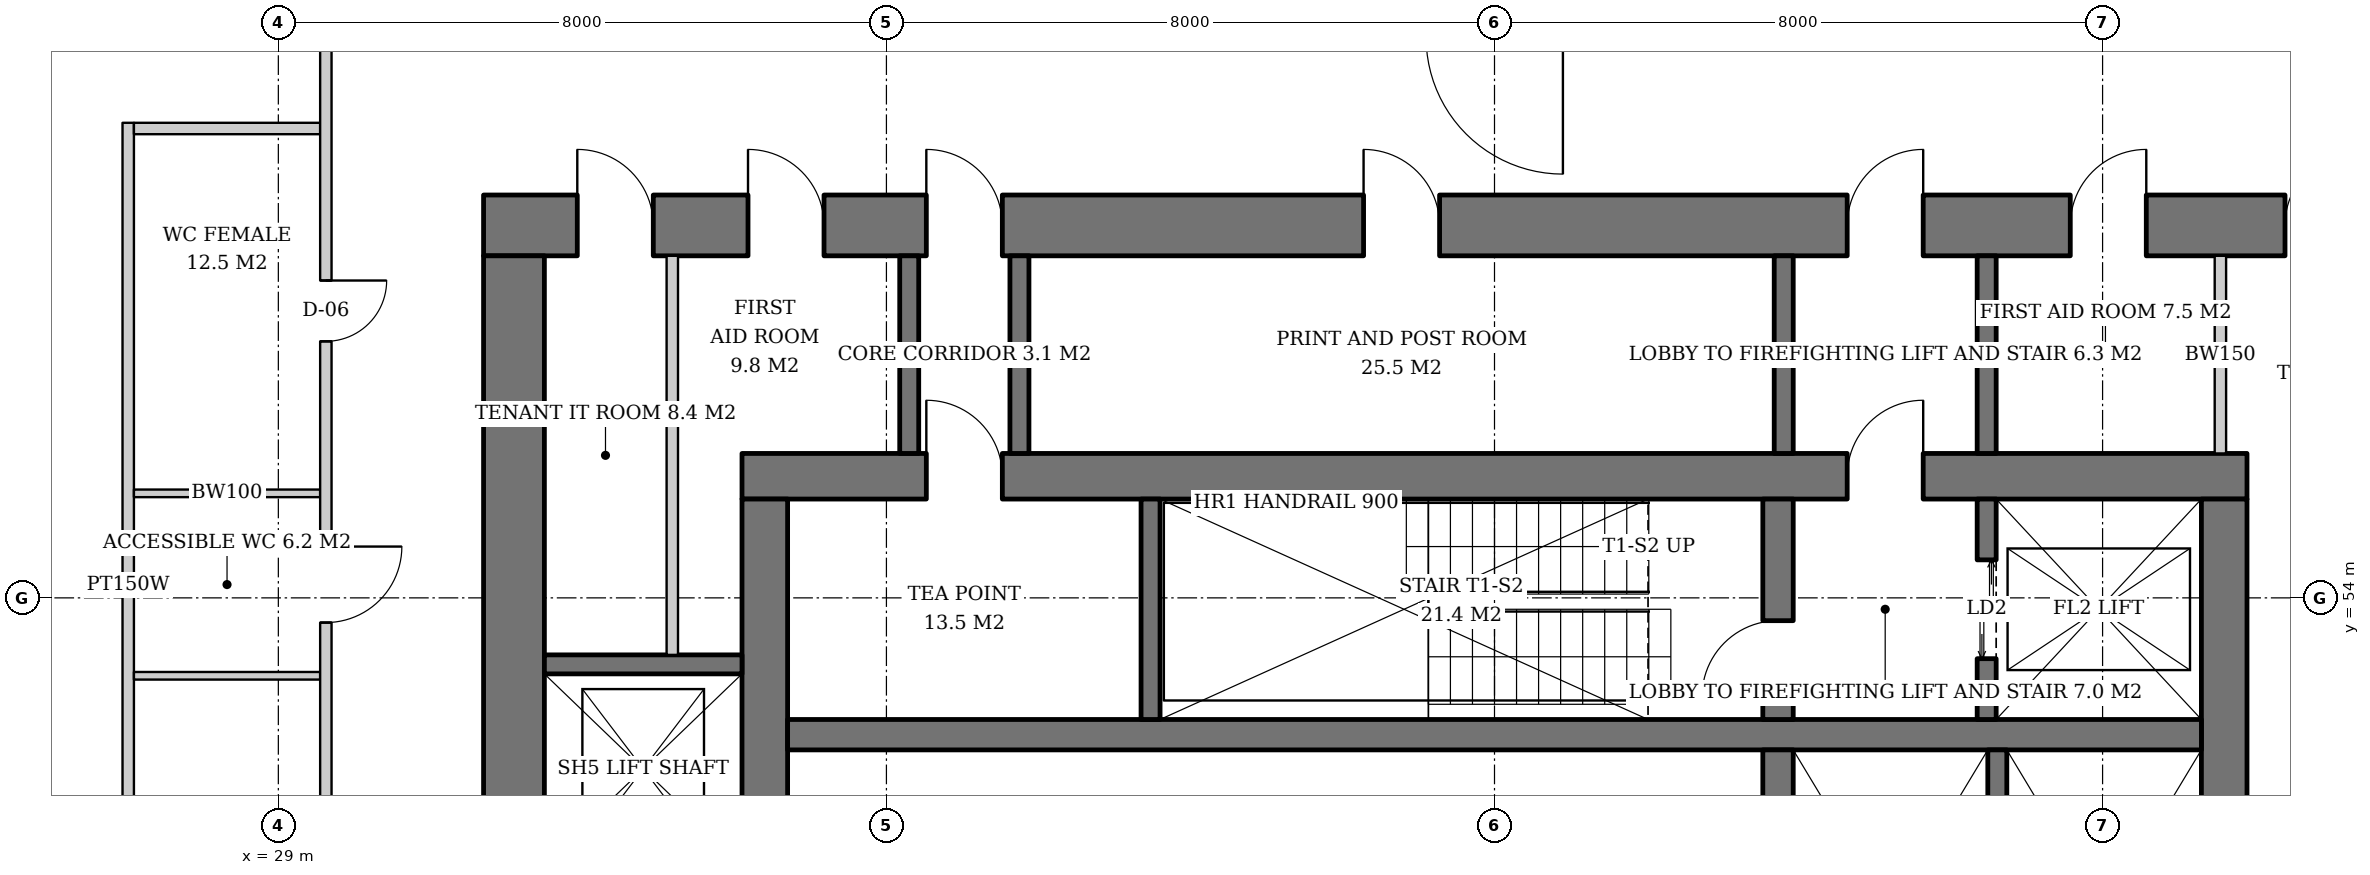
"""IFC4 building model, lengths in metres.
Left out: names, types, materials, properties, quantities, classifications, styles, units other than length and angle.
Written with IfcOpenShell. Run it as: python <this file> out.ifc"""

import sys

from ifc_helpers import new_model, si_unit, direction, frame, frame_2d, origin, place, context, subcontext, project, spatial, rectangle, extrude, element, fill, save


model = new_model("IFC4")
c1 = context("Model", 3, precision=1e-05, world=origin(), true_north=direction((0.0, 1.0)))
c2 = subcontext(c1, "Body", "Model", "MODEL_VIEW")
j1 = project(units=[si_unit("LENGTHUNIT", "METRE"), si_unit("PLANEANGLEUNIT", "RADIAN")], contexts=[c1])
p1 = place(None, origin())
s1 = spatial("IfcSite", under=j1, at=p1, CompositionType="ELEMENT")
p2 = place(p1, origin())
s2 = spatial("IfcBuilding", under=s1, at=p2, CompositionType="ELEMENT")
p3 = place(p2, frame((0.0, 0.0, 21.0)))
s3 = spatial("IfcBuildingStorey", under=s2, at=p3, CompositionType="ELEMENT", Elevation=21.0)
p4 = place(p3, frame((35.1, 55.6, 0.0), z_axis=(0.0, 0.0, 1.0), x_axis=(1.0, 0.0, 0.0)))
e1 = element("IfcWall", 1, at=p4, inside=s3, PredefinedType="SHEAR", context=c2, shape_type="SweptSolid", body=[
    extrude(rectangle(XDim=19.8, YDim=0.6, at=frame_2d((9.9, 0.0))), origin(), (0.0, 0.0, 1.0), 3.8),
])
p5 = place(p4, frame((14.54, 0.0, 0.0)))
e2 = element("IfcOpeningElement", 2, at=p5, cuts=e1, PredefinedType="OPENING", context=c2, shape_type="SweptSolid", body=[
    extrude(rectangle(XDim=1.0, YDim=2.1, at=frame_2d((0.5, 1.05))), frame((0.0, 0.31, 0.0), z_axis=(0.0, -1.0, 0.0), x_axis=(1.0, 0.0, 0.0)), (0.0, 0.0, 1.0), 0.62),
])
p6 = place(p4, frame((2.425, 0.0, 0.0)))
e3 = element("IfcOpeningElement", 3, at=p6, cuts=e1, PredefinedType="OPENING", context=c2, shape_type="SweptSolid", body=[
    extrude(rectangle(XDim=1.0, YDim=2.1, at=frame_2d((0.5, 1.05))), frame((0.0, 0.31, 0.0), z_axis=(0.0, -1.0, 0.0), x_axis=(1.0, 0.0, 0.0)), (0.0, 0.0, 1.0), 0.62),
])
p7 = place(p3, frame((35.4, 36.7, 0.0), z_axis=(0.0, 0.0, 1.0), x_axis=(0.0, 1.0, 0.0)))
e4 = element("IfcWall", 4, at=p7, inside=s3, PredefinedType="SHEAR", context=c2, shape_type="SweptSolid", body=[
    extrude(rectangle(XDim=18.6, YDim=0.6, at=frame_2d((9.3, 0.0))), origin(), (0.0, 0.0, 1.0), 3.8),
])
p8 = place(p7, frame((8.4, 0.0, 0.0)))
e5 = element("IfcOpeningElement", 5, at=p8, cuts=e4, PredefinedType="OPENING", context=c2, shape_type="SweptSolid", body=[
    extrude(rectangle(XDim=1.8, YDim=2.4, at=frame_2d((0.9, 1.2))), frame((0.0, 0.31, 0.0), z_axis=(0.0, -1.0, 0.0), x_axis=(1.0, 0.0, 0.0)), (0.0, 0.0, 1.0), 0.62),
])
p9 = place(p3, frame((54.6, 36.7, 0.0), z_axis=(0.0, 0.0, 1.0), x_axis=(0.0, 1.0, 0.0)))
e6 = element("IfcWall", 6, at=p9, inside=s3, PredefinedType="SHEAR", context=c2, shape_type="SweptSolid", body=[
    extrude(rectangle(XDim=18.6, YDim=0.6, at=frame_2d((9.3, 0.0))), origin(), (0.0, 0.0, 1.0), 3.8),
])
p10 = place(p9, frame((8.4, 0.0, 0.0)))
e7 = element("IfcOpeningElement", 7, at=p10, cuts=e6, PredefinedType="OPENING", context=c2, shape_type="SweptSolid", body=[
    extrude(rectangle(XDim=1.8, YDim=2.4, at=frame_2d((0.9, 1.2))), frame((0.0, 0.31, 0.0), z_axis=(0.0, -1.0, 0.0), x_axis=(1.0, 0.0, 0.0)), (0.0, 0.0, 1.0), 0.62),
])
p11 = place(p3, frame((31.7, 58.9, 0.0), z_axis=(0.0, 0.0, 1.0), x_axis=(1.0, 0.0, 0.0)))
e8 = element("IfcWall", 8, at=p11, inside=s3, PredefinedType="SHEAR", context=c2, shape_type="SweptSolid", body=[
    extrude(rectangle(XDim=26.6, YDim=0.8, at=frame_2d((13.3, 0.0))), origin(), (0.0, 0.0, 1.0), 3.8),
])
p12 = place(p11, frame((17.94, 0.0, 0.0)))
e9 = element("IfcOpeningElement", 9, at=p12, cuts=e8, PredefinedType="OPENING", context=c2, shape_type="SweptSolid", body=[
    extrude(rectangle(XDim=1.0, YDim=2.1, at=frame_2d((0.5, 1.05))), frame((0.0, 0.41, 0.0), z_axis=(0.0, -1.0, 0.0), x_axis=(1.0, 0.0, 0.0)), (0.0, 0.0, 1.0), 0.82),
])
p13 = place(p11, frame((5.825, 0.0, 0.0)))
e10 = element("IfcOpeningElement", 10, at=p13, cuts=e8, PredefinedType="OPENING", context=c2, shape_type="SweptSolid", body=[
    extrude(rectangle(XDim=1.0, YDim=2.1, at=frame_2d((0.5, 1.05))), frame((0.0, 0.41, 0.0), z_axis=(0.0, -1.0, 0.0), x_axis=(1.0, 0.0, 0.0)), (0.0, 0.0, 1.0), 0.82),
])
p14 = place(p11, frame((1.233, 0.0, 0.0)))
e11 = element("IfcOpeningElement", 11, at=p14, cuts=e8, PredefinedType="OPENING", context=c2, shape_type="SweptSolid", body=[
    extrude(rectangle(XDim=1.0, YDim=2.1, at=frame_2d((0.5, 1.05))), frame((0.0, 0.41, 0.0), z_axis=(0.0, -1.0, 0.0), x_axis=(1.0, 0.0, 0.0)), (0.0, 0.0, 1.0), 0.82),
])
p15 = place(p11, frame((3.479, 0.0, 0.0)))
e12 = element("IfcOpeningElement", 12, at=p15, cuts=e8, PredefinedType="OPENING", context=c2, shape_type="SweptSolid", body=[
    extrude(rectangle(XDim=1.0, YDim=2.1, at=frame_2d((0.5, 1.05))), frame((0.0, 0.41, 0.0), z_axis=(0.0, -1.0, 0.0), x_axis=(1.0, 0.0, 0.0)), (0.0, 0.0, 1.0), 0.82),
])
p16 = place(p11, frame((11.577, 0.0, 0.0)))
e13 = element("IfcOpeningElement", 13, at=p16, cuts=e8, PredefinedType="OPENING", context=c2, shape_type="SweptSolid", body=[
    extrude(rectangle(XDim=1.0, YDim=2.1, at=frame_2d((0.5, 1.05))), frame((0.0, 0.41, 0.0), z_axis=(0.0, -1.0, 0.0), x_axis=(1.0, 0.0, 0.0)), (0.0, 0.0, 1.0), 0.82),
])
p17 = place(p11, frame((20.875, 0.0, 0.0)))
e14 = element("IfcOpeningElement", 14, at=p17, cuts=e8, PredefinedType="OPENING", context=c2, shape_type="SweptSolid", body=[
    extrude(rectangle(XDim=1.0, YDim=2.1, at=frame_2d((0.5, 1.05))), frame((0.0, 0.41, 0.0), z_axis=(0.0, -1.0, 0.0), x_axis=(1.0, 0.0, 0.0)), (0.0, 0.0, 1.0), 0.82),
])
p18 = place(p11, frame((23.7, 0.0, 0.0)))
e15 = element("IfcOpeningElement", 15, at=p18, cuts=e8, PredefinedType="OPENING", context=c2, shape_type="SweptSolid", body=[
    extrude(rectangle(XDim=1.0, YDim=2.1, at=frame_2d((0.5, 1.05))), frame((0.0, 0.41, 0.0), z_axis=(0.0, -1.0, 0.0), x_axis=(1.0, 0.0, 0.0)), (0.0, 0.0, 1.0), 0.82),
])
p19 = place(p3, frame((32.1, 33.5, 0.0), z_axis=(0.0, 0.0, 1.0), x_axis=(0.0, 1.0, 0.0)))
e16 = element("IfcWall", 16, at=p19, inside=s3, PredefinedType="SHEAR", context=c2, shape_type="SweptSolid", body=[
    extrude(rectangle(XDim=25.0, YDim=0.8, at=frame_2d((12.5, 0.0))), origin(), (0.0, 0.0, 1.0), 3.8),
])
p20 = place(p19, frame((11.6, 0.0, 0.0)))
e17 = element("IfcOpeningElement", 17, at=p20, cuts=e16, PredefinedType="OPENING", context=c2, shape_type="SweptSolid", body=[
    extrude(rectangle(XDim=1.8, YDim=2.4, at=frame_2d((0.9, 1.2))), frame((0.0, 0.41, 0.0), z_axis=(0.0, -1.0, 0.0), x_axis=(1.0, 0.0, 0.0)), (0.0, 0.0, 1.0), 0.82),
])
p21 = place(p3, frame((35.7, 52.2, 0.0), z_axis=(0.0, 0.0, 1.0), x_axis=(1.0, 0.0, 0.0)))
e18 = element("IfcWall", 18, at=p21, inside=s3, PredefinedType="SHEAR", context=c2, shape_type="SweptSolid", body=[
    extrude(rectangle(XDim=18.6, YDim=0.4, at=frame_2d((9.3, 0.0))), origin(), (0.0, 0.0, 1.0), 3.8),
])
p22 = place(p3, frame((48.73, 40.0, 0.0), z_axis=(0.0, 0.0, 1.0), x_axis=(0.0, 1.0, 0.0)))
e19 = element("IfcWall", 19, at=p22, inside=s3, PredefinedType="SHEAR", context=c2, shape_type="SweptSolid", body=[
    extrude(rectangle(XDim=12.0, YDim=0.4, at=frame_2d((6.0, 0.0))), origin(), (0.0, 0.0, 1.0), 3.8),
])
p23 = place(p3, frame((48.73, 52.4, 0.0), z_axis=(0.0, 0.0, 1.0), x_axis=(0.0, 1.0, 0.0)))
e20 = element("IfcWall", 20, at=p23, inside=s3, PredefinedType="SHEAR", context=c2, shape_type="SweptSolid", body=[
    extrude(rectangle(XDim=2.9, YDim=0.4, at=frame_2d((1.45, 0.0))), origin(), (0.0, 0.0, 1.0), 3.8),
])
p24 = place(p23, frame((0.3, 0.0, 0.0)))
e21 = element("IfcOpeningElement", 21, at=p24, cuts=e20, PredefinedType="OPENING", context=c2, shape_type="SweptSolid", body=[
    extrude(rectangle(XDim=1.0, YDim=2.1, at=frame_2d((0.5, 1.05))), frame((0.0, 0.21, 0.0), z_axis=(0.0, -1.0, 0.0), x_axis=(1.0, 0.0, 0.0)), (0.0, 0.0, 1.0), 0.42),
])
p25 = place(p3, frame((40.475, 52.4, 0.0), z_axis=(0.0, 0.0, 1.0), x_axis=(0.0, 1.0, 0.0)))
e22 = element("IfcWall", 22, at=p25, inside=s3, PredefinedType="SHEAR", context=c2, shape_type="SweptSolid", body=[
    extrude(rectangle(XDim=2.9, YDim=0.25, at=frame_2d((1.45, 0.0))), origin(), (0.0, 0.0, 1.0), 3.8),
])
p26 = place(p3, frame((51.475, 52.4, 0.0), z_axis=(0.0, 0.0, 1.0), x_axis=(0.0, 1.0, 0.0)))
e23 = element("IfcWall", 23, at=p26, inside=s3, PredefinedType="SHEAR", context=c2, shape_type="SweptSolid", body=[
    extrude(rectangle(XDim=2.9, YDim=0.25, at=frame_2d((1.45, 0.0))), origin(), (0.0, 0.0, 1.0), 3.8),
])
p27 = place(p26, frame((0.8, 0.0, 0.0)))
e24 = element("IfcOpeningElement", 24, at=p27, cuts=e23, PredefinedType="OPENING", context=c2, shape_type="SweptSolid", body=[
    extrude(rectangle(XDim=1.3, YDim=2.2, at=frame_2d((0.65, 1.1))), frame((0.0, 0.135, 0.0), z_axis=(0.0, -1.0, 0.0), x_axis=(1.0, 0.0, 0.0)), (0.0, 0.0, 1.0), 0.27),
])
p28 = place(p3, frame((51.615, 47.75, 0.0), z_axis=(0.0, 0.0, 1.0), x_axis=(0.0, 1.0, 0.0)))
e25 = element("IfcWall", 25, at=p28, inside=s3, PredefinedType="SHEAR", context=c2, shape_type="SweptSolid", body=[
    extrude(rectangle(XDim=4.25, YDim=0.25, at=frame_2d((2.125, 0.0))), origin(), (0.0, 0.0, 1.0), 3.8),
])
p29 = place(p3, frame((32.5, 53.125, 0.0), z_axis=(0.0, 0.0, 1.0), x_axis=(1.0, 0.0, 0.0)))
e26 = element("IfcWall", 26, at=p29, inside=s3, PredefinedType="SHEAR", context=c2, shape_type="SweptSolid", body=[
    extrude(rectangle(XDim=2.6, YDim=0.25, at=frame_2d((1.3, 0.0))), origin(), (0.0, 0.0, 1.0), 3.8),
])
for number, where, z_axis, x_axis in (
    (27, (48.805, 55.9, 0.0), (0.0, 0.0, 1.0), (0.0, 1.0, 0.0)),
    (28, (51.475, 55.9, 0.0), (0.0, 0.0, 1.0), (0.0, 1.0, 0.0)),
    (29, (37.3, 55.9, 0.0), (0.0, 0.0, 1.0), (0.0, 1.0, 0.0)),
    (30, (38.75, 55.9, 0.0), (0.0, 0.0, 1.0), (0.0, 1.0, 0.0)),
):
    element("IfcWall", number, at=place(p3, frame(where, z_axis=z_axis, x_axis=x_axis)), inside=s3, PredefinedType="SOLIDWALL", context=c2, shape_type="SweptSolid", body=[
        extrude(rectangle(XDim=2.6, YDim=0.25, at=frame_2d((1.3, 0.0))), origin(), (0.0, 0.0, 1.0), 3.62),
    ])
p30 = place(p3, frame((34.183, 53.25, 0.0), z_axis=(0.0, 0.0, 1.0), x_axis=(0.0, 1.0, 0.0)))
e31 = element("IfcWall", 31, at=p30, inside=s3, PredefinedType="SOLIDWALL", context=c2, shape_type="SweptSolid", body=[
    extrude(rectangle(XDim=5.25, YDim=0.15, at=frame_2d((2.625, 0.0))), origin(), (0.0, 0.0, 1.0), 3.62),
])
p31 = place(p3, frame((54.55, 55.9, 0.0), z_axis=(0.0, 0.0, 1.0), x_axis=(0.0, 1.0, 0.0)))
e32 = element("IfcWall", 32, at=p31, inside=s3, PredefinedType="SOLIDWALL", context=c2, shape_type="SweptSolid", body=[
    extrude(rectangle(XDim=2.6, YDim=0.15, at=frame_2d((1.3, 0.0))), origin(), (0.0, 0.0, 1.0), 3.62),
])
p32 = place(p3, frame((27.025, 60.25, 0.0), z_axis=(0.0, 0.0, 1.0), x_axis=(0.0, -1.0, 0.0)))
e33 = element("IfcWall", 33, at=p32, inside=s3, PredefinedType="PARTITIONING", context=c2, shape_type="SweptSolid", body=[
    extrude(rectangle(XDim=12.15, YDim=0.15, at=frame_2d((6.075, 0.0))), origin(), (0.0, 0.0, 1.0), 2.612),
])
p33 = place(p3, frame((29.55, 60.175, 0.0), z_axis=(0.0, 0.0, 1.0), x_axis=(-1.0, 0.0, 0.0)))
e34 = element("IfcWall", 34, at=p33, inside=s3, PredefinedType="PARTITIONING", context=c2, shape_type="SweptSolid", body=[
    extrude(rectangle(XDim=2.45, YDim=0.15, at=frame_2d((1.225, 0.0))), origin(), (0.0, 0.0, 1.0), 2.806),
])
for number, where, z_axis, x_axis in (
    (35, (29.55, 55.375, 0.0), (0.0, 0.0, 1.0), (-1.0, 0.0, 0.0)),
    (36, (29.55, 52.975, 0.0), (0.0, 0.0, 1.0), (-1.0, 0.0, 0.0)),
):
    element("IfcWall", number, at=place(p3, frame(where, z_axis=z_axis, x_axis=x_axis)), inside=s3, PredefinedType="SOLIDWALL", context=c2, shape_type="SweptSolid", body=[
        extrude(rectangle(XDim=2.45, YDim=0.1, at=frame_2d((1.225, 0.0))), origin(), (0.0, 0.0, 1.0), 3.62),
    ])
p34 = place(p3, frame((29.625, 61.45, 0.0), z_axis=(0.0, 0.0, 1.0), x_axis=(0.0, -1.0, 0.0)))
e37 = element("IfcWall", 37, at=p34, inside=s3, PredefinedType="PARTITIONING", context=c2, shape_type="SweptSolid", body=[
    extrude(rectangle(XDim=30.75, YDim=0.15, at=frame_2d((15.375, 0.0))), origin(), (0.0, 0.0, 1.0), 2.612),
])
p35 = place(p34, frame((3.275, 0.0, 0.0)))
e38 = element("IfcOpeningElement", 38, at=p35, cuts=e37, PredefinedType="OPENING", context=c2, shape_type="SweptSolid", body=[
    extrude(rectangle(XDim=0.8, YDim=2.1, at=frame_2d((0.4, 1.05))), frame((0.0, 0.085, 0.0), z_axis=(0.0, -1.0, 0.0), x_axis=(1.0, 0.0, 0.0)), (0.0, 0.0, 1.0), 0.17),
])
p36 = place(p34, frame((6.775, 0.0, 0.0)))
e39 = element("IfcOpeningElement", 39, at=p36, cuts=e37, PredefinedType="OPENING", context=c2, shape_type="SweptSolid", body=[
    extrude(rectangle(XDim=1.0, YDim=2.1, at=frame_2d((0.5, 1.05))), frame((0.0, 0.085, 0.0), z_axis=(0.0, -1.0, 0.0), x_axis=(1.0, 0.0, 0.0)), (0.0, 0.0, 1.0), 0.17),
])
p37 = place(p34, frame((10.475, 0.0, 0.0)))
e40 = element("IfcOpeningElement", 40, at=p37, cuts=e37, PredefinedType="OPENING", context=c2, shape_type="SweptSolid", body=[
    extrude(rectangle(XDim=0.8, YDim=2.1, at=frame_2d((0.4, 1.05))), frame((0.0, 0.085, 0.0), z_axis=(0.0, -1.0, 0.0), x_axis=(1.0, 0.0, 0.0)), (0.0, 0.0, 1.0), 0.17),
])
p38 = place(p27, origin())
e41 = element("IfcDoor", 41, at=p38, inside=s3, OperationType="DOUBLE_DOOR_SLIDING", PredefinedType="DOOR", context=c2, shape_type="SweptSolid", body=[
    extrude(rectangle(XDim=1.3, YDim=2.2, at=frame_2d((0.65, 1.1))), frame((0.0, 0.025, 0.0), z_axis=(0.0, -1.0, 0.0), x_axis=(1.0, 0.0, 0.0)), (0.0, 0.0, 1.0), 0.05),
])
fill(e24, e41)
p39 = place(p24, origin())
e42 = element("IfcDoor", 42, at=p39, inside=s3, OperationType="SINGLE_SWING_LEFT", PredefinedType="DOOR", context=c2, shape_type="SweptSolid", body=[
    extrude(rectangle(XDim=1.0, YDim=2.1, at=frame_2d((0.5, 1.05))), frame((0.0, 0.025, 0.0), z_axis=(0.0, -1.0, 0.0), x_axis=(1.0, 0.0, 0.0)), (0.0, 0.0, 1.0), 0.05),
])
fill(e21, e42)
p40 = place(p5, origin())
e43 = element("IfcDoor", 43, at=p40, inside=s3, OperationType="SINGLE_SWING_RIGHT", PredefinedType="DOOR", context=c2, shape_type="SweptSolid", body=[
    extrude(rectangle(XDim=1.0, YDim=2.1, at=frame_2d((0.5, 1.05))), frame((0.0, 0.025, 0.0), z_axis=(0.0, -1.0, 0.0), x_axis=(1.0, 0.0, 0.0)), (0.0, 0.0, 1.0), 0.05),
])
fill(e2, e43)
p41 = place(p12, origin())
e44 = element("IfcDoor", 44, at=p41, inside=s3, OperationType="SINGLE_SWING_RIGHT", PredefinedType="DOOR", context=c2, shape_type="SweptSolid", body=[
    extrude(rectangle(XDim=1.0, YDim=2.1, at=frame_2d((0.5, 1.05))), frame((0.0, 0.025, 0.0), z_axis=(0.0, -1.0, 0.0), x_axis=(1.0, 0.0, 0.0)), (0.0, 0.0, 1.0), 0.05),
])
fill(e9, e44)
p42 = place(p13, origin())
e45 = element("IfcDoor", 45, at=p42, inside=s3, OperationType="SINGLE_SWING_LEFT", PredefinedType="DOOR", context=c2, shape_type="SweptSolid", body=[
    extrude(rectangle(XDim=1.0, YDim=2.1, at=frame_2d((0.5, 1.05))), frame((0.0, 0.025, 0.0), z_axis=(0.0, -1.0, 0.0), x_axis=(1.0, 0.0, 0.0)), (0.0, 0.0, 1.0), 0.05),
])
fill(e10, e45)
p43 = place(p6, origin())
e46 = element("IfcDoor", 46, at=p43, inside=s3, OperationType="SINGLE_SWING_LEFT", PredefinedType="DOOR", context=c2, shape_type="SweptSolid", body=[
    extrude(rectangle(XDim=1.0, YDim=2.1, at=frame_2d((0.5, 1.05))), frame((0.0, -0.24, 0.0), z_axis=(0.0, -1.0, 0.0), x_axis=(1.0, 0.0, 0.0)), (0.0, 0.0, 1.0), 0.05),
])
fill(e3, e46)
p44 = place(p14, origin())
e47 = element("IfcDoor", 47, at=p44, inside=s3, OperationType="SINGLE_SWING_LEFT", PredefinedType="DOOR", context=c2, shape_type="SweptSolid", body=[
    extrude(rectangle(XDim=1.0, YDim=2.1, at=frame_2d((0.5, 1.05))), frame((0.0, -0.34, 0.0), z_axis=(0.0, -1.0, 0.0), x_axis=(1.0, 0.0, 0.0)), (0.0, 0.0, 1.0), 0.05),
])
fill(e11, e47)
p45 = place(p15, origin())
e48 = element("IfcDoor", 48, at=p45, inside=s3, OperationType="SINGLE_SWING_LEFT", PredefinedType="DOOR", context=c2, shape_type="SweptSolid", body=[
    extrude(rectangle(XDim=1.0, YDim=2.1, at=frame_2d((0.5, 1.05))), frame((0.0, -0.34, 0.0), z_axis=(0.0, -1.0, 0.0), x_axis=(1.0, 0.0, 0.0)), (0.0, 0.0, 1.0), 0.05),
])
fill(e12, e48)
p46 = place(p16, origin())
e49 = element("IfcDoor", 49, at=p46, inside=s3, OperationType="SINGLE_SWING_LEFT", PredefinedType="DOOR", context=c2, shape_type="SweptSolid", body=[
    extrude(rectangle(XDim=1.0, YDim=2.1, at=frame_2d((0.5, 1.05))), frame((0.0, -0.34, 0.0), z_axis=(0.0, -1.0, 0.0), x_axis=(1.0, 0.0, 0.0)), (0.0, 0.0, 1.0), 0.05),
])
fill(e13, e49)
p47 = place(p17, origin())
e50 = element("IfcDoor", 50, at=p47, inside=s3, OperationType="SINGLE_SWING_RIGHT", PredefinedType="DOOR", context=c2, shape_type="SweptSolid", body=[
    extrude(rectangle(XDim=1.0, YDim=2.1, at=frame_2d((0.5, 1.05))), frame((0.0, -0.34, 0.0), z_axis=(0.0, -1.0, 0.0), x_axis=(1.0, 0.0, 0.0)), (0.0, 0.0, 1.0), 0.05),
])
fill(e14, e50)
p48 = place(p18, origin())
e51 = element("IfcDoor", 51, at=p48, inside=s3, OperationType="SINGLE_SWING_RIGHT", PredefinedType="DOOR", context=c2, shape_type="SweptSolid", body=[
    extrude(rectangle(XDim=1.0, YDim=2.1, at=frame_2d((0.5, 1.05))), frame((0.0, -0.34, 0.0), z_axis=(0.0, -1.0, 0.0), x_axis=(1.0, 0.0, 0.0)), (0.0, 0.0, 1.0), 0.05),
])
fill(e15, e51)
p49 = place(p35, origin())
e52 = element("IfcDoor", 52, at=p49, inside=s3, OperationType="SINGLE_SWING_LEFT", PredefinedType="DOOR", context=c2, shape_type="SweptSolid", body=[
    extrude(rectangle(XDim=0.8, YDim=2.1, at=frame_2d((0.4, 1.05))), frame((0.0, 0.025, 0.0), z_axis=(0.0, -1.0, 0.0), x_axis=(1.0, 0.0, 0.0)), (0.0, 0.0, 1.0), 0.05),
])
fill(e38, e52)
p50 = place(p36, origin())
e53 = element("IfcDoor", 53, at=p50, inside=s3, OperationType="SINGLE_SWING_LEFT", PredefinedType="DOOR", context=c2, shape_type="SweptSolid", body=[
    extrude(rectangle(XDim=1.0, YDim=2.1, at=frame_2d((0.5, 1.05))), frame((0.0, 0.025, 0.0), z_axis=(0.0, -1.0, 0.0), x_axis=(1.0, 0.0, 0.0)), (0.0, 0.0, 1.0), 0.05),
])
fill(e39, e53)
save(model, sys.argv[1])
